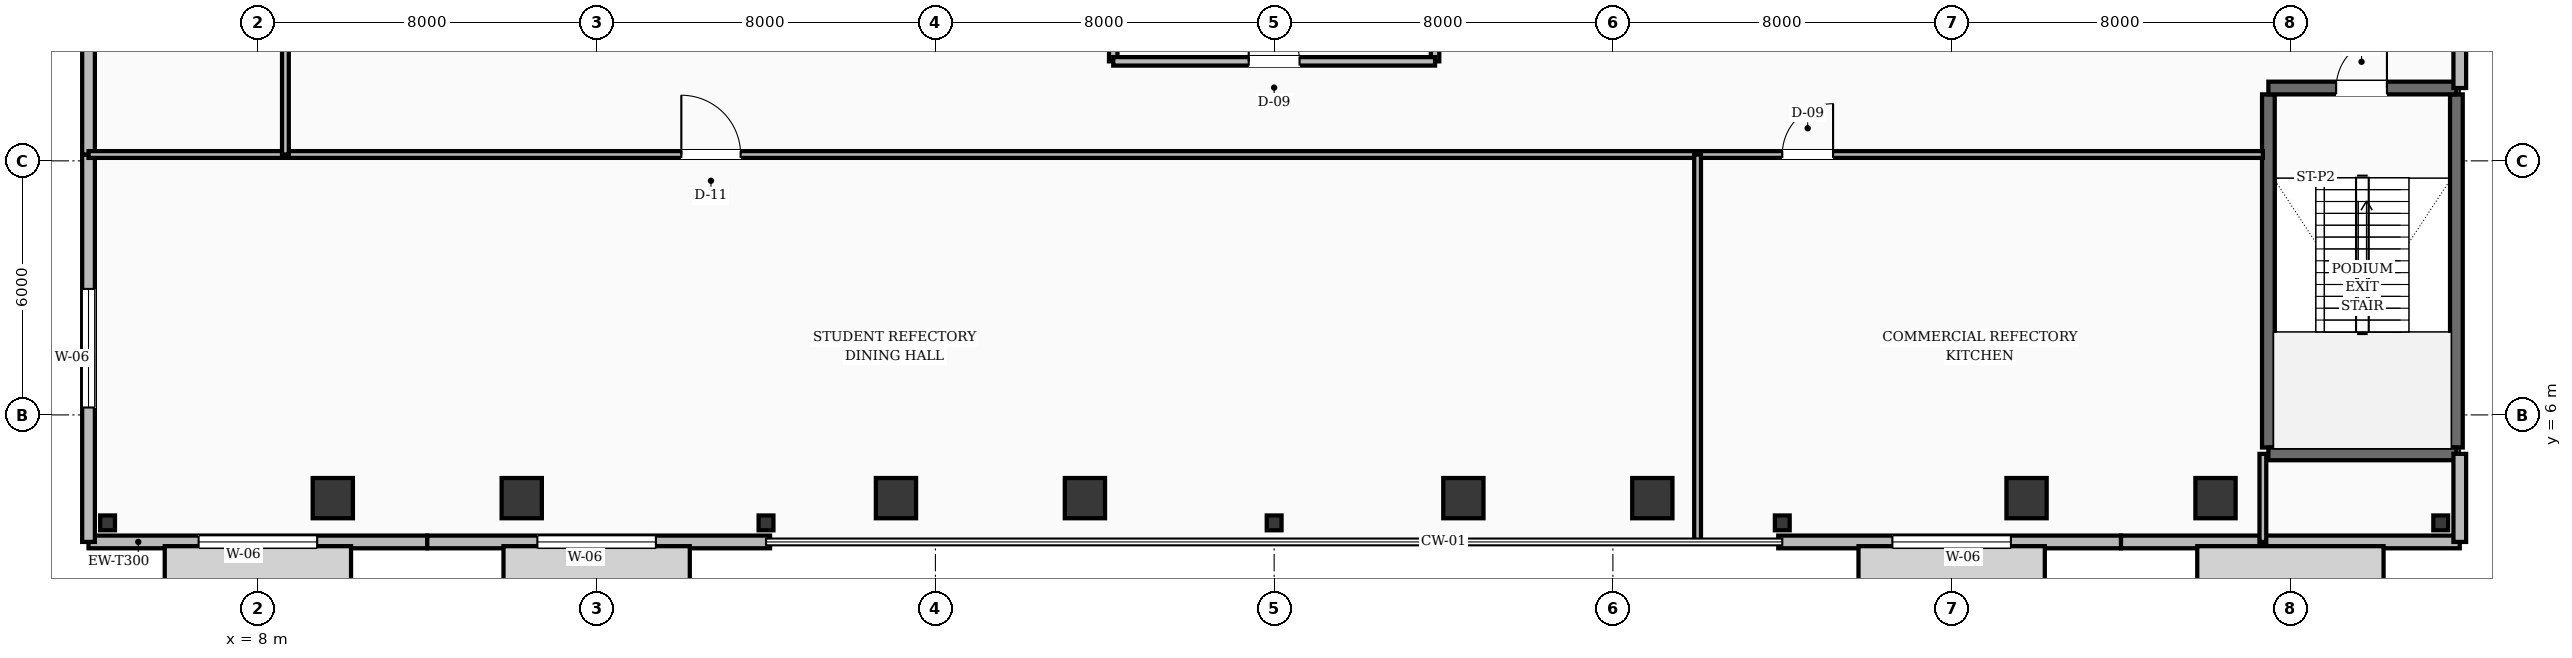
"""IFC4 building model, lengths in metres.
Left out: names, types, materials, properties, quantities, classifications, styles, units other than length and angle.
Written with IfcOpenShell. Run it as: python <this file> out.ifc"""

import sys

from ifc_helpers import new_model, si_unit, direction, frame, frame_2d, origin, origin_2d, place, context, subcontext, project, spatial, rectangle, hollow_circle, i_section, extrude, element, fill, save


model = new_model("IFC4")
c1 = context("Model", 3, precision=1e-05, world=origin(), true_north=direction((0.0, 1.0)))
c2 = subcontext(c1, "Body", "Model", "MODEL_VIEW")
j1 = project(units=[si_unit("LENGTHUNIT", "METRE"), si_unit("PLANEANGLEUNIT", "RADIAN")], contexts=[c1])
p1 = place(None, origin())
s1 = spatial("IfcSite", under=j1, at=p1, CompositionType="ELEMENT")
p2 = place(p1, origin())
s2 = spatial("IfcBuilding", under=s1, at=p2, CompositionType="ELEMENT")
p3 = place(p2, frame((0.0, 0.0, 10.0)))
s3 = spatial("IfcBuildingStorey", under=s2, at=p3, CompositionType="ELEMENT", Elevation=10.0)
for number, where, z_axis, x_axis in (
    (1, (55.48, 5.23, 0.0), (0.0, 0.0, 1.0), (0.0, 1.0, 0.0)),
    (2, (59.92, 5.23, 0.0), (0.0, 0.0, 1.0), (0.0, 1.0, 0.0)),
):
    element("IfcWall", number, at=place(p3, frame(where, z_axis=z_axis, x_axis=x_axis)), inside=s3, PredefinedType="SHEAR", context=c2, shape_type="SweptSolid", body=[
        extrude(rectangle(XDim=8.34, YDim=0.3, at=frame_2d((4.17, 0.0))), origin(), (0.0, 0.0, 1.0), 4.8),
    ])
p4 = place(p3, frame((55.48, 5.08, 0.0), z_axis=(0.0, 0.0, 1.0), x_axis=(1.0, 0.0, 0.0)))
e3 = element("IfcWall", 3, at=p4, inside=s3, PredefinedType="SHEAR", context=c2, shape_type="SweptSolid", body=[
    extrude(rectangle(XDim=4.44, YDim=0.3, at=frame_2d((2.22, 0.0))), origin(), (0.0, 0.0, 1.0), 4.8),
])
p5 = place(p3, frame((55.48, 13.72, 0.0), z_axis=(0.0, 0.0, 1.0), x_axis=(1.0, 0.0, 0.0)))
e4 = element("IfcWall", 4, at=p5, inside=s3, PredefinedType="SHEAR", context=c2, shape_type="SweptSolid", body=[
    extrude(rectangle(XDim=4.44, YDim=0.3, at=frame_2d((2.22, 0.0))), origin(), (0.0, 0.0, 1.0), 4.8),
])
p6 = place(p5, frame((1.6, 0.0, 0.0)))
e5 = element("IfcOpeningElement", 5, at=p6, cuts=e4, PredefinedType="OPENING", context=c2, shape_type="SweptSolid", body=[
    extrude(rectangle(XDim=1.2, YDim=2.1, at=frame_2d((0.6, 1.05))), frame((0.0, 0.16, 0.0), z_axis=(0.0, -1.0, 0.0), x_axis=(1.0, 0.0, 0.0)), (0.0, 0.0, 1.0), 0.32),
])
for number, where, z_axis, x_axis in (
    (6, (4.45, 3.45, 0.0), (0.0, 0.0, 1.0), (1.0, 0.0, 0.0)),
    (7, (20.0, 3.45, 0.0), (0.0, 0.0, 1.0), (1.0, 0.0, 0.0)),
    (8, (32.0, 3.45, 0.0), (0.0, 0.0, 1.0), (1.0, 0.0, 0.0)),
    (9, (44.0, 3.45, 0.0), (0.0, 0.0, 1.0), (1.0, 0.0, 0.0)),
    (10, (59.55, 3.45, 0.0), (0.0, 0.0, 1.0), (1.0, 0.0, 0.0)),
):
    element("IfcColumn", number, at=place(p3, frame(where, z_axis=z_axis, x_axis=x_axis)), inside=s3, PredefinedType="COLUMN", context=c2, shape_type="SweptSolid", body=[
        extrude(i_section(OverallWidth=0.35, OverallDepth=0.35, WebThickness=0.012, FlangeThickness=0.019, FilletRadius=0.016, at=origin_2d()), origin(), (0.0, 0.0, 1.0), 4.8),
    ])
for number, where, z_axis, x_axis in (
    (11, (10.023, 3.921, 0.0), (-0.105, 0.047, 0.993), (-0.407, -0.913, 0.0)),
    (12, (13.977, 3.921, 0.0), (0.105, 0.047, 0.993), (-0.407, 0.913, 0.0)),
    (13, (23.323, 3.921, 0.0), (-0.105, 0.047, 0.993), (-0.407, -0.913, 0.0)),
    (14, (27.277, 3.921, 0.0), (0.105, 0.047, 0.993), (-0.407, 0.913, 0.0)),
    (15, (36.723, 3.921, 0.0), (-0.105, 0.047, 0.993), (-0.407, -0.913, 0.0)),
    (16, (40.677, 3.921, 0.0), (0.105, 0.047, 0.993), (-0.407, 0.913, 0.0)),
    (17, (50.023, 3.921, 0.0), (-0.105, 0.047, 0.993), (-0.407, -0.913, 0.0)),
    (18, (53.977, 3.921, 0.0), (0.105, 0.047, 0.993), (-0.407, 0.913, 0.0)),
):
    element("IfcColumn", number, at=place(p3, frame(where, z_axis=z_axis, x_axis=x_axis)), inside=s3, PredefinedType="COLUMN", context=c2, shape_type="SweptSolid", body=[
        extrude(hollow_circle(Radius=0.475, WallThickness=0.045, at=origin_2d()), origin(), (0.0, 0.0, 1.0), 4.832),
    ])
p7 = place(p3, frame((4.0, 3.0, 0.0), z_axis=(0.0, 0.0, 1.0), x_axis=(1.0, 0.0, 0.0)))
e19 = element("IfcWall", 19, at=p7, inside=s3, PredefinedType="STANDARD", context=c2, shape_type="SweptSolid", body=[
    extrude(rectangle(XDim=8.0, YDim=0.3, at=frame_2d((4.0, 0.0))), origin(), (0.0, 0.0, 1.0), 3.57),
])
p8 = place(p7, frame((2.6, 0.0, 0.85)))
e20 = element("IfcOpeningElement", 20, at=p8, cuts=e19, PredefinedType="OPENING", context=c2, shape_type="SweptSolid", body=[
    extrude(rectangle(XDim=2.8, YDim=2.3, at=frame_2d((1.4, 1.15))), frame((0.0, 0.16, 0.0), z_axis=(0.0, -1.0, 0.0), x_axis=(1.0, 0.0, 0.0)), (0.0, 0.0, 1.0), 0.32),
])
p9 = place(p3, frame((12.0, 3.0, 0.0), z_axis=(0.0, 0.0, 1.0), x_axis=(1.0, 0.0, 0.0)))
e21 = element("IfcWall", 21, at=p9, inside=s3, PredefinedType="STANDARD", context=c2, shape_type="SweptSolid", body=[
    extrude(rectangle(XDim=8.095, YDim=0.3, at=frame_2d((4.047, 0.0))), origin(), (0.0, 0.0, 1.0), 3.57),
])
p10 = place(p9, frame((2.6, 0.0, 0.85)))
e22 = element("IfcOpeningElement", 22, at=p10, cuts=e21, PredefinedType="OPENING", context=c2, shape_type="SweptSolid", body=[
    extrude(rectangle(XDim=2.8, YDim=2.3, at=frame_2d((1.4, 1.15))), frame((0.0, 0.16, 0.0), z_axis=(0.0, -1.0, 0.0), x_axis=(1.0, 0.0, 0.0)), (0.0, 0.0, 1.0), 0.32),
])
p11 = place(p3, frame((43.905, 3.0, 0.0), z_axis=(0.0, 0.0, 1.0), x_axis=(1.0, 0.0, 0.0)))
e23 = element("IfcWall", 23, at=p11, inside=s3, PredefinedType="STANDARD", context=c2, shape_type="SweptSolid", body=[
    extrude(rectangle(XDim=8.095, YDim=0.3, at=frame_2d((4.047, 0.0))), origin(), (0.0, 0.0, 1.0), 3.57),
])
p12 = place(p11, frame((2.695, 0.0, 0.85)))
e24 = element("IfcOpeningElement", 24, at=p12, cuts=e23, PredefinedType="OPENING", context=c2, shape_type="SweptSolid", body=[
    extrude(rectangle(XDim=2.8, YDim=2.3, at=frame_2d((1.4, 1.15))), frame((0.0, 0.16, 0.0), z_axis=(0.0, -1.0, 0.0), x_axis=(1.0, 0.0, 0.0)), (0.0, 0.0, 1.0), 0.32),
])
p13 = place(p3, frame((52.0, 3.0, 0.0), z_axis=(0.0, 0.0, 1.0), x_axis=(1.0, 0.0, 0.0)))
e25 = element("IfcWall", 25, at=p13, inside=s3, PredefinedType="STANDARD", context=c2, shape_type="SweptSolid", body=[
    extrude(rectangle(XDim=8.0, YDim=0.3, at=frame_2d((4.0, 0.0))), origin(), (0.0, 0.0, 1.0), 3.57),
])
p14 = place(p3, frame((4.0, 12.15, 0.0), z_axis=(0.0, 0.0, 1.0), x_axis=(0.0, -1.0, 0.0)))
e26 = element("IfcWall", 26, at=p14, inside=s3, PredefinedType="STANDARD", context=c2, shape_type="SweptSolid", body=[
    extrude(rectangle(XDim=9.15, YDim=0.3, at=frame_2d((4.575, 0.0))), origin(), (0.0, 0.0, 1.0), 3.57),
])
p15 = place(p14, frame((3.175, 0.0, 0.85)))
e27 = element("IfcOpeningElement", 27, at=p15, cuts=e26, PredefinedType="OPENING", context=c2, shape_type="SweptSolid", body=[
    extrude(rectangle(XDim=2.8, YDim=2.3, at=frame_2d((1.4, 1.15))), frame((0.0, 0.16, 0.0), z_axis=(0.0, -1.0, 0.0), x_axis=(1.0, 0.0, 0.0)), (0.0, 0.0, 1.0), 0.32),
])
p16 = place(p3, frame((4.0, 22.0, 0.0), z_axis=(0.0, 0.0, 1.0), x_axis=(0.0, -1.0, 0.0)))
e28 = element("IfcWall", 28, at=p16, inside=s3, PredefinedType="STANDARD", context=c2, shape_type="SweptSolid", body=[
    extrude(rectangle(XDim=9.85, YDim=0.3, at=frame_2d((4.925, 0.0))), origin(), (0.0, 0.0, 1.0), 3.57),
])
p17 = place(p16, frame((3.525, 0.0, 0.85)))
e29 = element("IfcOpeningElement", 29, at=p17, cuts=e28, PredefinedType="OPENING", context=c2, shape_type="SweptSolid", body=[
    extrude(rectangle(XDim=2.8, YDim=2.3, at=frame_2d((1.4, 1.15))), frame((0.0, 0.16, 0.0), z_axis=(0.0, -1.0, 0.0), x_axis=(1.0, 0.0, 0.0)), (0.0, 0.0, 1.0), 0.32),
])
p18 = place(p3, frame((60.0, 3.0, 0.0), z_axis=(0.0, 0.0, 1.0), x_axis=(0.0, 1.0, 0.0)))
e30 = element("IfcWall", 30, at=p18, inside=s3, PredefinedType="STANDARD", context=c2, shape_type="SweptSolid", body=[
    extrude(rectangle(XDim=2.08, YDim=0.3, at=frame_2d((1.04, 0.0))), origin(), (0.0, 0.0, 1.0), 3.57),
])
p19 = place(p3, frame((60.0, 13.72, 0.0), z_axis=(0.0, 0.0, 1.0), x_axis=(0.0, 1.0, 0.0)))
e31 = element("IfcWall", 31, at=p19, inside=s3, PredefinedType="STANDARD", context=c2, shape_type="SweptSolid", body=[
    extrude(rectangle(XDim=1.83, YDim=0.3, at=frame_2d((0.915, 0.0))), origin(), (0.0, 0.0, 1.0), 3.57),
])
for number, where, z_axis, x_axis in (
    (32, (28.2, 14.35, 0.0), (0.0, 0.0, 1.0), (0.0, 1.0, 0.0)),
    (33, (35.8, 14.35, 0.0), (0.0, 0.0, 1.0), (0.0, 1.0, 0.0)),
):
    element("IfcWall", number, at=place(p3, frame(where, z_axis=z_axis, x_axis=x_axis)), inside=s3, PredefinedType="SOLIDWALL", context=c2, shape_type="SweptSolid", body=[
        extrude(rectangle(XDim=2.2, YDim=0.2, at=frame_2d((1.1, 0.0))), origin(), (0.0, 0.0, 1.0), 3.52),
    ])
p20 = place(p3, frame((28.2, 14.35, 0.0), z_axis=(0.0, 0.0, 1.0), x_axis=(1.0, 0.0, 0.0)))
e34 = element("IfcWall", 34, at=p20, inside=s3, PredefinedType="SOLIDWALL", context=c2, shape_type="SweptSolid", body=[
    extrude(rectangle(XDim=7.6, YDim=0.2, at=frame_2d((3.8, 0.0))), origin(), (0.0, 0.0, 1.0), 3.52),
])
p21 = place(p20, frame((3.2, 0.0, 0.0)))
e35 = element("IfcOpeningElement", 35, at=p21, cuts=e34, PredefinedType="OPENING", context=c2, shape_type="SweptSolid", body=[
    extrude(rectangle(XDim=1.2, YDim=2.1, at=frame_2d((0.6, 1.05))), frame((0.0, 0.11, 0.0), z_axis=(0.0, -1.0, 0.0), x_axis=(1.0, 0.0, 0.0)), (0.0, 0.0, 1.0), 0.22),
])
p22 = place(p3, frame((4.0, 12.15, 0.0), z_axis=(0.0, 0.0, 1.0), x_axis=(1.0, 0.0, 0.0)))
e36 = element("IfcWall", 36, at=p22, inside=s3, PredefinedType="SOLIDWALL", context=c2, shape_type="SweptSolid", body=[
    extrude(rectangle(XDim=51.35, YDim=0.16, at=frame_2d((25.675, 0.0))), origin(), (0.0, 0.0, 1.0), 3.52),
])
p23 = place(p22, frame((14.0, 0.0, 0.0)))
e37 = element("IfcOpeningElement", 37, at=p23, cuts=e36, PredefinedType="OPENING", context=c2, shape_type="SweptSolid", body=[
    extrude(rectangle(XDim=1.4, YDim=2.15, at=frame_2d((0.7, 1.075))), frame((0.0, 0.09, 0.0), z_axis=(0.0, -1.0, 0.0), x_axis=(1.0, 0.0, 0.0)), (0.0, 0.0, 1.0), 0.18),
])
p24 = place(p22, frame((40.0, 0.0, 0.0)))
e38 = element("IfcOpeningElement", 38, at=p24, cuts=e36, PredefinedType="OPENING", context=c2, shape_type="SweptSolid", body=[
    extrude(rectangle(XDim=1.2, YDim=2.1, at=frame_2d((0.6, 1.05))), frame((0.0, 0.09, 0.0), z_axis=(0.0, -1.0, 0.0), x_axis=(1.0, 0.0, 0.0)), (0.0, 0.0, 1.0), 0.18),
])
p25 = place(p3, frame((8.65, 12.15, 0.0), z_axis=(0.0, 0.0, 1.0), x_axis=(0.0, 1.0, 0.0)))
e39 = element("IfcWall", 39, at=p25, inside=s3, PredefinedType="SOLIDWALL", context=c2, shape_type="SweptSolid", body=[
    extrude(rectangle(XDim=20.25, YDim=0.16, at=frame_2d((10.125, 0.0))), origin(), (0.0, 0.0, 1.0), 3.52),
])
p26 = place(p25, frame((8.0, 0.0, 0.0)))
e40 = element("IfcOpeningElement", 40, at=p26, cuts=e39, PredefinedType="OPENING", context=c2, shape_type="SweptSolid", body=[
    extrude(rectangle(XDim=1.0, YDim=2.1, at=frame_2d((0.5, 1.05))), frame((0.0, 0.09, 0.0), z_axis=(0.0, -1.0, 0.0), x_axis=(1.0, 0.0, 0.0)), (0.0, 0.0, 1.0), 0.18),
])
p27 = place(p3, frame((42.0, 3.0, 0.0), z_axis=(0.0, 0.0, 1.0), x_axis=(0.0, 1.0, 0.0)))
e41 = element("IfcWall", 41, at=p27, inside=s3, PredefinedType="SOLIDWALL", context=c2, shape_type="SweptSolid", body=[
    extrude(rectangle(XDim=9.15, YDim=0.16, at=frame_2d((4.575, 0.0))), origin(), (0.0, 0.0, 1.0), 3.52),
])
p28 = place(p3, frame((55.35, 3.0, 0.0), z_axis=(0.0, 0.0, 1.0), x_axis=(0.0, 1.0, 0.0)))
e42 = element("IfcWall", 42, at=p28, inside=s3, PredefinedType="SOLIDWALL", context=c2, shape_type="SweptSolid", body=[
    extrude(rectangle(XDim=2.08, YDim=0.16, at=frame_2d((1.04, 0.0))), origin(), (0.0, 0.0, 1.0), 3.52),
])
p29 = place(p8, origin())
e43 = element("IfcWindow", 43, at=p29, inside=s3, PartitioningType="SINGLE_PANEL", PredefinedType="WINDOW", context=c2, shape_type="SweptSolid", body=[
    extrude(rectangle(XDim=2.8, YDim=2.3, at=frame_2d((1.4, 1.15))), frame((0.0, 0.03, 0.0), z_axis=(0.0, -1.0, 0.0), x_axis=(1.0, 0.0, 0.0)), (0.0, 0.0, 1.0), 0.06),
])
fill(e20, e43)
p30 = place(p10, origin())
e44 = element("IfcWindow", 44, at=p30, inside=s3, PartitioningType="SINGLE_PANEL", PredefinedType="WINDOW", context=c2, shape_type="SweptSolid", body=[
    extrude(rectangle(XDim=2.8, YDim=2.3, at=frame_2d((1.4, 1.15))), frame((0.0, 0.03, 0.0), z_axis=(0.0, -1.0, 0.0), x_axis=(1.0, 0.0, 0.0)), (0.0, 0.0, 1.0), 0.06),
])
fill(e22, e44)
p31 = place(p12, origin())
e45 = element("IfcWindow", 45, at=p31, inside=s3, PartitioningType="SINGLE_PANEL", PredefinedType="WINDOW", context=c2, shape_type="SweptSolid", body=[
    extrude(rectangle(XDim=2.8, YDim=2.3, at=frame_2d((1.4, 1.15))), frame((0.0, 0.03, 0.0), z_axis=(0.0, -1.0, 0.0), x_axis=(1.0, 0.0, 0.0)), (0.0, 0.0, 1.0), 0.06),
])
fill(e24, e45)
p32 = place(p15, origin())
e46 = element("IfcWindow", 46, at=p32, inside=s3, PartitioningType="SINGLE_PANEL", PredefinedType="WINDOW", context=c2, shape_type="SweptSolid", body=[
    extrude(rectangle(XDim=2.8, YDim=2.3, at=frame_2d((1.4, 1.15))), frame((0.0, 0.03, 0.0), z_axis=(0.0, -1.0, 0.0), x_axis=(1.0, 0.0, 0.0)), (0.0, 0.0, 1.0), 0.06),
])
fill(e27, e46)
p33 = place(p6, origin())
e47 = element("IfcDoor", 47, at=p33, inside=s3, OperationType="SINGLE_SWING_RIGHT", PredefinedType="DOOR", context=c2, shape_type="SweptSolid", body=[
    extrude(rectangle(XDim=1.2, YDim=2.1, at=frame_2d((0.6, 1.05))), frame((0.0, 0.025, 0.0), z_axis=(0.0, -1.0, 0.0), x_axis=(1.0, 0.0, 0.0)), (0.0, 0.0, 1.0), 0.05),
])
fill(e5, e47)
p34 = place(p21, origin())
e48 = element("IfcDoor", 48, at=p34, inside=s3, OperationType="SINGLE_SWING_LEFT", PredefinedType="DOOR", context=c2, shape_type="SweptSolid", body=[
    extrude(rectangle(XDim=1.2, YDim=2.1, at=frame_2d((0.6, 1.05))), frame((0.0, 0.025, 0.0), z_axis=(0.0, -1.0, 0.0), x_axis=(1.0, 0.0, 0.0)), (0.0, 0.0, 1.0), 0.05),
])
fill(e35, e48)
p35 = place(p23, origin())
e49 = element("IfcDoor", 49, at=p35, inside=s3, OperationType="SINGLE_SWING_LEFT", PredefinedType="DOOR", context=c2, shape_type="SweptSolid", body=[
    extrude(rectangle(XDim=1.4, YDim=2.15, at=frame_2d((0.7, 1.075))), frame((0.0, 0.025, 0.0), z_axis=(0.0, -1.0, 0.0), x_axis=(1.0, 0.0, 0.0)), (0.0, 0.0, 1.0), 0.05),
])
fill(e37, e49)
p36 = place(p24, origin())
e50 = element("IfcDoor", 50, at=p36, inside=s3, OperationType="SINGLE_SWING_RIGHT", PredefinedType="DOOR", context=c2, shape_type="SweptSolid", body=[
    extrude(rectangle(XDim=1.2, YDim=2.1, at=frame_2d((0.6, 1.05))), frame((0.0, 0.025, 0.0), z_axis=(0.0, -1.0, 0.0), x_axis=(1.0, 0.0, 0.0)), (0.0, 0.0, 1.0), 0.05),
])
fill(e38, e50)
save(model, sys.argv[1])
